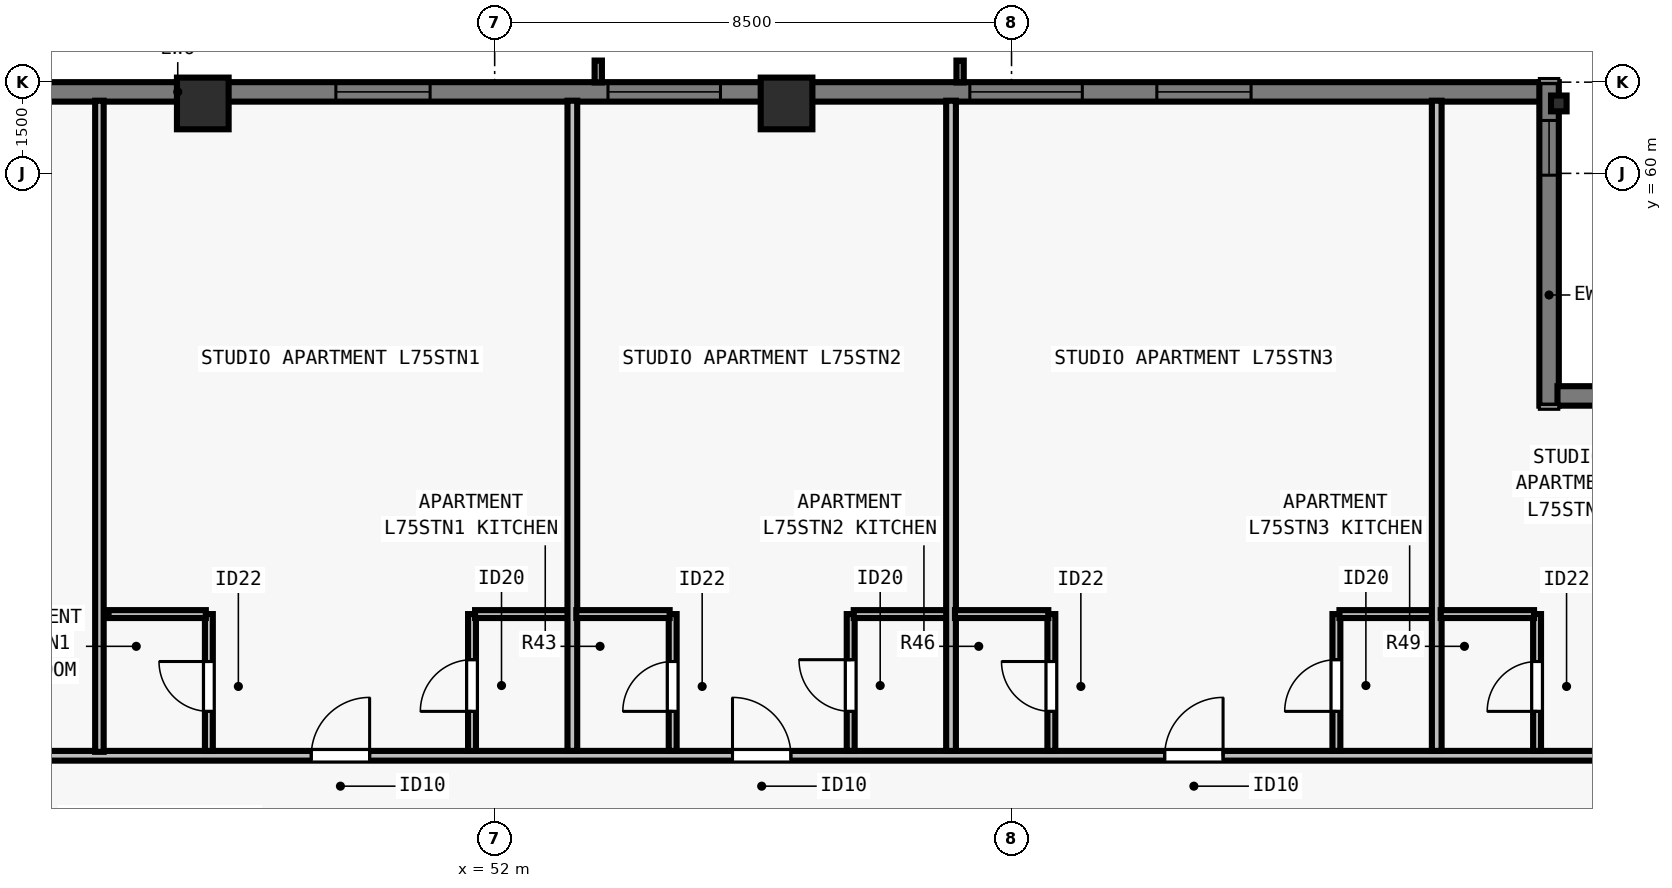
"""IFC4 building model, lengths in metres.
Left out: names, types, materials, properties, quantities, classifications, styles, units other than length and angle.
Written with IfcOpenShell. Run it as: python <this file> out.ifc"""

import sys

from ifc_helpers import new_model, si_unit, direction, frame, frame_2d, origin, origin_2d, place, context, subcontext, project, spatial, rectangle, i_section, extrude, element, fill, save


model = new_model("IFC4")
c1 = context("Model", 3, precision=1e-05, world=origin(), true_north=direction((0.0, 1.0)))
c2 = subcontext(c1, "Body", "Model", "MODEL_VIEW")
j1 = project(units=[si_unit("LENGTHUNIT", "METRE"), si_unit("PLANEANGLEUNIT", "RADIAN")], contexts=[c1])
p1 = place(None, origin())
s1 = spatial("IfcSite", under=j1, at=p1, CompositionType="ELEMENT")
p2 = place(p1, origin())
s2 = spatial("IfcBuilding", under=s1, at=p2, CompositionType="ELEMENT")
p3 = place(p2, frame((0.0, 0.0, 272.5)))
s3 = spatial("IfcBuildingStorey", under=s2, at=p3, CompositionType="ELEMENT", Elevation=272.5)
p4 = place(p3, frame((69.5, 61.15, 0.0), z_axis=(0.0, 0.0, 1.0), x_axis=(1.0, 0.0, 0.0)))
e1 = element("IfcColumn", 1, at=p4, inside=s3, PredefinedType="COLUMN", context=c2, shape_type="SweptSolid", body=[
    extrude(i_section(OverallWidth=0.256, OverallDepth=0.26, WebThickness=0.01, FlangeThickness=0.017, FilletRadius=0.013, at=origin_2d()), origin(), (0.0, 0.0, 1.0), 3.5),
])
for number, where, z_axis, x_axis in (
    (2, (56.8, 61.15, 0.0), (0.0, 0.0, 1.0), (1.0, 0.0, 0.0)),
    (3, (47.2, 61.15, 0.0), (0.0, 0.0, 1.0), (1.0, 0.0, 0.0)),
):
    element("IfcColumn", number, at=place(p3, frame(where, z_axis=z_axis, x_axis=x_axis)), inside=s3, PredefinedType="COLUMN", context=c2, shape_type="SweptSolid", body=[
        extrude(rectangle(XDim=0.85, YDim=0.85, at=origin_2d()), origin(), (0.0, 0.0, 1.0), 3.5),
    ])
p5 = place(p3, frame((34.5, 61.34, 0.0), z_axis=(0.0, 0.0, 1.0), x_axis=(1.0, 0.0, 0.0)))
e4 = element("IfcWall", 4, at=p5, inside=s3, PredefinedType="SOLIDWALL", context=c2, shape_type="SweptSolid", body=[
    extrude(rectangle(XDim=34.702, YDim=0.32, at=frame_2d((17.351, 0.0))), origin(), (0.0, 0.0, 1.0), 3.24),
])
p6 = place(p5, frame((4.613, 0.0, 0.8)))
e5 = element("IfcOpeningElement", 5, at=p6, cuts=e4, PredefinedType="OPENING", context=c2, shape_type="SweptSolid", body=[
    extrude(rectangle(XDim=1.85, YDim=1.628, at=frame_2d((0.925, 0.814))), frame((0.0, 0.17, 0.0), z_axis=(0.0, -1.0, 0.0), x_axis=(1.0, 0.0, 0.0)), (0.0, 0.0, 1.0), 0.34),
])
p7 = place(p5, frame((8.138, 0.0, 0.8)))
e6 = element("IfcOpeningElement", 6, at=p7, cuts=e4, PredefinedType="OPENING", context=c2, shape_type="SweptSolid", body=[
    extrude(rectangle(XDim=1.55, YDim=1.628, at=frame_2d((0.775, 0.814))), frame((0.0, 0.17, 0.0), z_axis=(0.0, -1.0, 0.0), x_axis=(1.0, 0.0, 0.0)), (0.0, 0.0, 1.0), 0.34),
])
p8 = place(p5, frame((14.888, 0.0, 0.8)))
e7 = element("IfcOpeningElement", 7, at=p8, cuts=e4, PredefinedType="OPENING", context=c2, shape_type="SweptSolid", body=[
    extrude(rectangle(XDim=1.55, YDim=1.628, at=frame_2d((0.775, 0.814))), frame((0.0, 0.17, 0.0), z_axis=(0.0, -1.0, 0.0), x_axis=(1.0, 0.0, 0.0)), (0.0, 0.0, 1.0), 0.34),
])
p9 = place(p5, frame((19.364, 0.0, 0.8)))
e8 = element("IfcOpeningElement", 8, at=p9, cuts=e4, PredefinedType="OPENING", context=c2, shape_type="SweptSolid", body=[
    extrude(rectangle(XDim=1.85, YDim=1.628, at=frame_2d((0.925, 0.814))), frame((0.0, 0.17, 0.0), z_axis=(0.0, -1.0, 0.0), x_axis=(1.0, 0.0, 0.0)), (0.0, 0.0, 1.0), 0.34),
])
p10 = place(p5, frame((25.314, 0.0, 0.8)))
e9 = element("IfcOpeningElement", 9, at=p10, cuts=e4, PredefinedType="OPENING", context=c2, shape_type="SweptSolid", body=[
    extrude(rectangle(XDim=1.85, YDim=1.628, at=frame_2d((0.925, 0.814))), frame((0.0, 0.17, 0.0), z_axis=(0.0, -1.0, 0.0), x_axis=(1.0, 0.0, 0.0)), (0.0, 0.0, 1.0), 0.34),
])
p11 = place(p5, frame((28.389, 0.0, 0.8)))
e10 = element("IfcOpeningElement", 10, at=p11, cuts=e4, PredefinedType="OPENING", context=c2, shape_type="SweptSolid", body=[
    extrude(rectangle(XDim=1.55, YDim=1.628, at=frame_2d((0.775, 0.814))), frame((0.0, 0.17, 0.0), z_axis=(0.0, -1.0, 0.0), x_axis=(1.0, 0.0, 0.0)), (0.0, 0.0, 1.0), 0.34),
])
p12 = place(p3, frame((69.34, 61.5, 0.0), z_axis=(0.0, 0.0, 1.0), x_axis=(0.0, -1.0, 0.0)))
e11 = element("IfcWall", 11, at=p12, inside=s3, PredefinedType="SOLIDWALL", context=c2, shape_type="SweptSolid", body=[
    extrude(rectangle(XDim=5.32, YDim=0.32, at=frame_2d((2.66, 0.0))), origin(), (0.0, 0.0, 1.0), 3.24),
])
p13 = place(p12, frame((0.63, 0.0, 0.8)))
e12 = element("IfcOpeningElement", 12, at=p13, cuts=e11, PredefinedType="OPENING", context=c2, shape_type="SweptSolid", body=[
    extrude(rectangle(XDim=0.9, YDim=1.628, at=frame_2d((0.45, 0.814))), frame((0.0, 0.17, 0.0), z_axis=(0.0, -1.0, 0.0), x_axis=(1.0, 0.0, 0.0)), (0.0, 0.0, 1.0), 0.34),
])
p14 = place(p3, frame((69.478, 56.34, 0.0), z_axis=(0.0, 0.0, 1.0), x_axis=(1.0, 0.0, 0.0)))
e13 = element("IfcWall", 13, at=p14, inside=s3, PredefinedType="SOLIDWALL", context=c2, shape_type="SweptSolid", body=[
    extrude(rectangle(XDim=4.724, YDim=0.32, at=frame_2d((2.362, 0.0))), origin(), (0.0, 0.0, 1.0), 3.24),
])
p15 = place(p3, frame((29.805, 50.423, 0.0), z_axis=(0.0, 0.0, 1.0), x_axis=(1.0, 0.0, 0.0)))
e14 = element("IfcWall", 14, at=p15, inside=s3, PredefinedType="PARTITIONING", context=c2, shape_type="SweptSolid", body=[
    extrude(rectangle(XDim=44.39, YDim=0.16, at=frame_2d((22.195, 0.0))), origin(), (0.0, 0.0, 1.0), 2.908),
])
p16 = place(p15, frame((5.465, 0.0, 0.0)))
e15 = element("IfcOpeningElement", 15, at=p16, cuts=e14, PredefinedType="OPENING", context=c2, shape_type="SweptSolid", body=[
    extrude(rectangle(XDim=0.96, YDim=2.12, at=frame_2d((0.48, 1.06))), frame((0.0, 0.09, 0.0), z_axis=(0.0, -1.0, 0.0), x_axis=(1.0, 0.0, 0.0)), (0.0, 0.0, 1.0), 0.18),
])
p17 = place(p15, frame((19.179, 0.0, 0.0)))
e16 = element("IfcOpeningElement", 16, at=p17, cuts=e14, PredefinedType="OPENING", context=c2, shape_type="SweptSolid", body=[
    extrude(rectangle(XDim=0.96, YDim=2.18, at=frame_2d((0.48, 1.09))), frame((0.0, 0.09, 0.0), z_axis=(0.0, -1.0, 0.0), x_axis=(1.0, 0.0, 0.0)), (0.0, 0.0, 1.0), 0.18),
])
p18 = place(p15, frame((26.106, 0.0, 0.0)))
e17 = element("IfcOpeningElement", 17, at=p18, cuts=e14, PredefinedType="OPENING", context=c2, shape_type="SweptSolid", body=[
    extrude(rectangle(XDim=0.96, YDim=2.18, at=frame_2d((0.48, 1.09))), frame((0.0, 0.09, 0.0), z_axis=(0.0, -1.0, 0.0), x_axis=(1.0, 0.0, 0.0)), (0.0, 0.0, 1.0), 0.18),
])
p19 = place(p15, frame((33.214, 0.0, 0.0)))
e18 = element("IfcOpeningElement", 18, at=p19, cuts=e14, PredefinedType="OPENING", context=c2, shape_type="SweptSolid", body=[
    extrude(rectangle(XDim=0.96, YDim=2.18, at=frame_2d((0.48, 1.09))), frame((0.0, 0.09, 0.0), z_axis=(0.0, -1.0, 0.0), x_axis=(1.0, 0.0, 0.0)), (0.0, 0.0, 1.0), 0.18),
])
p20 = place(p15, frame((40.501, 0.0, 0.0)))
e19 = element("IfcOpeningElement", 19, at=p20, cuts=e14, PredefinedType="OPENING", context=c2, shape_type="SweptSolid", body=[
    extrude(rectangle(XDim=0.96, YDim=2.18, at=frame_2d((0.48, 1.09))), frame((0.0, 0.09, 0.0), z_axis=(0.0, -1.0, 0.0), x_axis=(1.0, 0.0, 0.0)), (0.0, 0.0, 1.0), 0.18),
])
p21 = place(p3, frame((45.5, 50.488, 0.0), z_axis=(0.0, 0.0, 1.0), x_axis=(0.0, 1.0, 0.0)))
e20 = element("IfcWall", 20, at=p21, inside=s3, PredefinedType="PARTITIONING", context=c2, shape_type="SweptSolid", body=[
    extrude(rectangle(XDim=10.708, YDim=0.14, at=frame_2d((5.354, 0.0))), origin(), (0.0, 0.0, 1.0), 3.24),
])
p22 = place(p3, frame((47.3, 50.502, 0.0), z_axis=(0.0, 0.0, 1.0), x_axis=(0.0, 1.0, 0.0)))
e21 = element("IfcWall", 21, at=p22, inside=s3, PredefinedType="PLUMBINGWALL", context=c2, shape_type="SweptSolid", body=[
    extrude(rectangle(XDim=2.25, YDim=0.13, at=frame_2d((1.125, 0.0))), origin(), (0.0, 0.0, 1.0), 2.523),
])
p23 = place(p22, frame((0.65, 0.0, 0.0)))
e22 = element("IfcOpeningElement", 22, at=p23, cuts=e21, PredefinedType="OPENING", context=c2, shape_type="SweptSolid", body=[
    extrude(rectangle(XDim=0.82, YDim=2.1, at=frame_2d((0.41, 1.05))), frame((0.0, 0.075, 0.0), z_axis=(0.0, -1.0, 0.0), x_axis=(1.0, 0.0, 0.0)), (0.0, 0.0, 1.0), 0.15),
])
p24 = place(p3, frame((45.65, 52.752, 0.0), z_axis=(0.0, 0.0, 1.0), x_axis=(1.0, 0.0, 0.0)))
e23 = element("IfcWall", 23, at=p24, inside=s3, PredefinedType="PLUMBINGWALL", context=c2, shape_type="SweptSolid", body=[
    extrude(rectangle(XDim=1.6, YDim=0.13, at=frame_2d((0.8, 0.0))), origin(), (0.0, 0.0, 1.0), 3.24),
])
p25 = place(p3, frame((51.627, 50.502, 0.0), z_axis=(0.0, 0.0, 1.0), x_axis=(0.0, 1.0, 0.0)))
e24 = element("IfcWall", 24, at=p25, inside=s3, PredefinedType="PLUMBINGWALL", context=c2, shape_type="SweptSolid", body=[
    extrude(rectangle(XDim=2.25, YDim=0.13, at=frame_2d((1.125, 0.0))), origin(), (0.0, 0.0, 1.0), 3.24),
])
p26 = place(p25, frame((0.65, 0.0, 0.0)))
e25 = element("IfcOpeningElement", 25, at=p26, cuts=e24, PredefinedType="OPENING", context=c2, shape_type="SweptSolid", body=[
    extrude(rectangle(XDim=0.85, YDim=2.1, at=frame_2d((0.425, 1.05))), frame((0.0, 0.075, 0.0), z_axis=(0.0, -1.0, 0.0), x_axis=(1.0, 0.0, 0.0)), (0.0, 0.0, 1.0), 0.15),
])
p27 = place(p3, frame((51.677, 52.752, 0.0), z_axis=(0.0, 0.0, 1.0), x_axis=(1.0, 0.0, 0.0)))
e26 = element("IfcWall", 26, at=p27, inside=s3, PredefinedType="PLUMBINGWALL", context=c2, shape_type="SweptSolid", body=[
    extrude(rectangle(XDim=1.6, YDim=0.13, at=frame_2d((0.8, 0.0))), origin(), (0.0, 0.0, 1.0), 3.24),
])
p28 = place(p3, frame((53.278, 50.502, 0.0), z_axis=(0.0, 0.0, 1.0), x_axis=(0.0, 1.0, 0.0)))
e27 = element("IfcWall", 27, at=p28, inside=s3, PredefinedType="PARTITIONING", context=c2, shape_type="SweptSolid", body=[
    extrude(rectangle(XDim=10.693, YDim=0.16, at=frame_2d((5.346, 0.0))), origin(), (0.0, 0.0, 1.0), 2.908),
])
p29 = place(p3, frame((54.927, 50.502, 0.0), z_axis=(0.0, 0.0, 1.0), x_axis=(0.0, 1.0, 0.0)))
e28 = element("IfcWall", 28, at=p29, inside=s3, PredefinedType="PLUMBINGWALL", context=c2, shape_type="SweptSolid", body=[
    extrude(rectangle(XDim=2.25, YDim=0.13, at=frame_2d((1.125, 0.0))), origin(), (0.0, 0.0, 1.0), 3.24),
])
p30 = place(p29, frame((0.65, 0.0, 0.0)))
e29 = element("IfcOpeningElement", 29, at=p30, cuts=e28, PredefinedType="OPENING", context=c2, shape_type="SweptSolid", body=[
    extrude(rectangle(XDim=0.82, YDim=2.1, at=frame_2d((0.41, 1.05))), frame((0.0, 0.075, 0.0), z_axis=(0.0, -1.0, 0.0), x_axis=(1.0, 0.0, 0.0)), (0.0, 0.0, 1.0), 0.15),
])
p31 = place(p3, frame((53.343, 52.752, 0.0), z_axis=(0.0, 0.0, 1.0), x_axis=(1.0, 0.0, 0.0)))
e30 = element("IfcWall", 30, at=p31, inside=s3, PredefinedType="PLUMBINGWALL", context=c2, shape_type="SweptSolid", body=[
    extrude(rectangle(XDim=1.535, YDim=0.13, at=frame_2d((0.768, 0.0))), origin(), (0.0, 0.0, 1.0), 3.24),
])
p32 = place(p3, frame((57.855, 50.502, 0.0), z_axis=(0.0, 0.0, 1.0), x_axis=(0.0, 1.0, 0.0)))
e31 = element("IfcWall", 31, at=p32, inside=s3, PredefinedType="PLUMBINGWALL", context=c2, shape_type="SweptSolid", body=[
    extrude(rectangle(XDim=2.25, YDim=0.13, at=frame_2d((1.125, 0.0))), origin(), (0.0, 0.0, 1.0), 3.24),
])
p33 = place(p32, frame((0.65, 0.0, 0.0)))
e32 = element("IfcOpeningElement", 32, at=p33, cuts=e31, PredefinedType="OPENING", context=c2, shape_type="SweptSolid", body=[
    extrude(rectangle(XDim=0.85, YDim=2.1, at=frame_2d((0.425, 1.05))), frame((0.0, 0.075, 0.0), z_axis=(0.0, -1.0, 0.0), x_axis=(1.0, 0.0, 0.0)), (0.0, 0.0, 1.0), 0.15),
])
p34 = place(p3, frame((57.905, 52.752, 0.0), z_axis=(0.0, 0.0, 1.0), x_axis=(1.0, 0.0, 0.0)))
e33 = element("IfcWall", 33, at=p34, inside=s3, PredefinedType="PLUMBINGWALL", context=c2, shape_type="SweptSolid", body=[
    extrude(rectangle(XDim=1.6, YDim=0.13, at=frame_2d((0.8, 0.0))), origin(), (0.0, 0.0, 1.0), 3.24),
])
p35 = place(p3, frame((59.505, 50.502, 0.0), z_axis=(0.0, 0.0, 1.0), x_axis=(0.0, 1.0, 0.0)))
e34 = element("IfcWall", 34, at=p35, inside=s3, PredefinedType="PARTITIONING", context=c2, shape_type="SweptSolid", body=[
    extrude(rectangle(XDim=10.693, YDim=0.16, at=frame_2d((5.346, 0.0))), origin(), (0.0, 0.0, 1.0), 3.24),
])
p36 = place(p3, frame((61.155, 50.502, 0.0), z_axis=(0.0, 0.0, 1.0), x_axis=(0.0, 1.0, 0.0)))
e35 = element("IfcWall", 35, at=p36, inside=s3, PredefinedType="PLUMBINGWALL", context=c2, shape_type="SweptSolid", body=[
    extrude(rectangle(XDim=2.25, YDim=0.13, at=frame_2d((1.125, 0.0))), origin(), (0.0, 0.0, 1.0), 3.24),
])
p37 = place(p36, frame((0.65, 0.0, 0.0)))
e36 = element("IfcOpeningElement", 36, at=p37, cuts=e35, PredefinedType="OPENING", context=c2, shape_type="SweptSolid", body=[
    extrude(rectangle(XDim=0.82, YDim=2.1, at=frame_2d((0.41, 1.05))), frame((0.0, 0.075, 0.0), z_axis=(0.0, -1.0, 0.0), x_axis=(1.0, 0.0, 0.0)), (0.0, 0.0, 1.0), 0.15),
])
p38 = place(p3, frame((59.57, 52.752, 0.0), z_axis=(0.0, 0.0, 1.0), x_axis=(1.0, 0.0, 0.0)))
e37 = element("IfcWall", 37, at=p38, inside=s3, PredefinedType="PLUMBINGWALL", context=c2, shape_type="SweptSolid", body=[
    extrude(rectangle(XDim=1.535, YDim=0.13, at=frame_2d((0.768, 0.0))), origin(), (0.0, 0.0, 1.0), 3.24),
])
p39 = place(p3, frame((65.843, 50.502, 0.0), z_axis=(0.0, 0.0, 1.0), x_axis=(0.0, 1.0, 0.0)))
e38 = element("IfcWall", 38, at=p39, inside=s3, PredefinedType="PLUMBINGWALL", context=c2, shape_type="SweptSolid", body=[
    extrude(rectangle(XDim=2.25, YDim=0.13, at=frame_2d((1.125, 0.0))), origin(), (0.0, 0.0, 1.0), 3.24),
])
p40 = place(p39, frame((0.65, 0.0, 0.0)))
e39 = element("IfcOpeningElement", 39, at=p40, cuts=e38, PredefinedType="OPENING", context=c2, shape_type="SweptSolid", body=[
    extrude(rectangle(XDim=0.85, YDim=2.1, at=frame_2d((0.425, 1.05))), frame((0.0, 0.075, 0.0), z_axis=(0.0, -1.0, 0.0), x_axis=(1.0, 0.0, 0.0)), (0.0, 0.0, 1.0), 0.15),
])
p41 = place(p3, frame((65.893, 52.752, 0.0), z_axis=(0.0, 0.0, 1.0), x_axis=(1.0, 0.0, 0.0)))
e40 = element("IfcWall", 40, at=p41, inside=s3, PredefinedType="PLUMBINGWALL", context=c2, shape_type="SweptSolid", body=[
    extrude(rectangle(XDim=1.6, YDim=0.13, at=frame_2d((0.8, 0.0))), origin(), (0.0, 0.0, 1.0), 3.24),
])
p42 = place(p3, frame((67.492, 50.502, 0.0), z_axis=(0.0, 0.0, 1.0), x_axis=(0.0, 1.0, 0.0)))
e41 = element("IfcWall", 41, at=p42, inside=s3, PredefinedType="PARTITIONING", context=c2, shape_type="SweptSolid", body=[
    extrude(rectangle(XDim=10.693, YDim=0.16, at=frame_2d((5.346, 0.0))), origin(), (0.0, 0.0, 1.0), 2.523),
])
p43 = place(p3, frame((69.143, 50.502, 0.0), z_axis=(0.0, 0.0, 1.0), x_axis=(0.0, 1.0, 0.0)))
e42 = element("IfcWall", 42, at=p43, inside=s3, PredefinedType="PLUMBINGWALL", context=c2, shape_type="SweptSolid", body=[
    extrude(rectangle(XDim=2.25, YDim=0.13, at=frame_2d((1.125, 0.0))), origin(), (0.0, 0.0, 1.0), 3.24),
])
p44 = place(p43, frame((0.65, 0.0, 0.0)))
e43 = element("IfcOpeningElement", 43, at=p44, cuts=e42, PredefinedType="OPENING", context=c2, shape_type="SweptSolid", body=[
    extrude(rectangle(XDim=0.82, YDim=2.1, at=frame_2d((0.41, 1.05))), frame((0.0, 0.075, 0.0), z_axis=(0.0, -1.0, 0.0), x_axis=(1.0, 0.0, 0.0)), (0.0, 0.0, 1.0), 0.15),
])
p45 = place(p3, frame((67.558, 52.752, 0.0), z_axis=(0.0, 0.0, 1.0), x_axis=(1.0, 0.0, 0.0)))
e44 = element("IfcWall", 44, at=p45, inside=s3, PredefinedType="PLUMBINGWALL", context=c2, shape_type="SweptSolid", body=[
    extrude(rectangle(XDim=1.535, YDim=0.13, at=frame_2d((0.768, 0.0))), origin(), (0.0, 0.0, 1.0), 2.908),
])
p46 = place(p8, origin())
e45 = element("IfcWindow", 45, at=p46, inside=s3, PartitioningType="SINGLE_PANEL", PredefinedType="WINDOW", context=c2, shape_type="SweptSolid", body=[
    extrude(rectangle(XDim=1.55, YDim=1.628, at=frame_2d((0.775, 0.814))), frame((0.0, -0.05, 0.0), z_axis=(0.0, -1.0, 0.0), x_axis=(1.0, 0.0, 0.0)), (0.0, 0.0, 1.0), 0.06),
])
fill(e7, e45)
p47 = place(p9, origin())
e46 = element("IfcWindow", 46, at=p47, inside=s3, PartitioningType="SINGLE_PANEL", PredefinedType="WINDOW", context=c2, shape_type="SweptSolid", body=[
    extrude(rectangle(XDim=1.85, YDim=1.628, at=frame_2d((0.925, 0.814))), frame((0.0, -0.05, 0.0), z_axis=(0.0, -1.0, 0.0), x_axis=(1.0, 0.0, 0.0)), (0.0, 0.0, 1.0), 0.06),
])
fill(e8, e46)
p48 = place(p10, origin())
e47 = element("IfcWindow", 47, at=p48, inside=s3, PartitioningType="SINGLE_PANEL", PredefinedType="WINDOW", context=c2, shape_type="SweptSolid", body=[
    extrude(rectangle(XDim=1.85, YDim=1.628, at=frame_2d((0.925, 0.814))), frame((0.0, -0.05, 0.0), z_axis=(0.0, -1.0, 0.0), x_axis=(1.0, 0.0, 0.0)), (0.0, 0.0, 1.0), 0.06),
])
fill(e9, e47)
p49 = place(p11, origin())
e48 = element("IfcWindow", 48, at=p49, inside=s3, PartitioningType="SINGLE_PANEL", PredefinedType="WINDOW", context=c2, shape_type="SweptSolid", body=[
    extrude(rectangle(XDim=1.55, YDim=1.628, at=frame_2d((0.775, 0.814))), frame((0.0, -0.05, 0.0), z_axis=(0.0, -1.0, 0.0), x_axis=(1.0, 0.0, 0.0)), (0.0, 0.0, 1.0), 0.06),
])
fill(e10, e48)
p50 = place(p13, origin())
e49 = element("IfcWindow", 49, at=p50, inside=s3, PartitioningType="SINGLE_PANEL", PredefinedType="WINDOW", context=c2, shape_type="SweptSolid", body=[
    extrude(rectangle(XDim=0.9, YDim=1.628, at=frame_2d((0.45, 0.814))), frame((0.0, -0.04, 0.0), z_axis=(0.0, -1.0, 0.0), x_axis=(1.0, 0.0, 0.0)), (0.0, 0.0, 1.0), 0.06),
])
fill(e12, e49)
p51 = place(p23, origin())
e50 = element("IfcDoor", 50, at=p51, inside=s3, OperationType="SINGLE_SWING_RIGHT", PredefinedType="DOOR", context=c2, shape_type="SweptSolid", body=[
    extrude(rectangle(XDim=0.82, YDim=2.1, at=frame_2d((0.41, 1.05))), frame((0.0, 0.025, 0.0), z_axis=(0.0, -1.0, 0.0), x_axis=(1.0, 0.0, 0.0)), (0.0, 0.0, 1.0), 0.05),
])
fill(e22, e50)
p52 = place(p26, origin())
e51 = element("IfcDoor", 51, at=p52, inside=s3, OperationType="SINGLE_SWING_LEFT", PredefinedType="DOOR", context=c2, shape_type="SweptSolid", body=[
    extrude(rectangle(XDim=0.85, YDim=2.1, at=frame_2d((0.425, 1.05))), frame((0.0, 0.025, 0.0), z_axis=(0.0, -1.0, 0.0), x_axis=(1.0, 0.0, 0.0)), (0.0, 0.0, 1.0), 0.05),
])
fill(e25, e51)
p53 = place(p17, origin())
e52 = element("IfcDoor", 52, at=p53, inside=s3, OperationType="SINGLE_SWING_RIGHT", PredefinedType="DOOR", context=c2, shape_type="SweptSolid", body=[
    extrude(rectangle(XDim=0.96, YDim=2.18, at=frame_2d((0.48, 1.09))), frame((0.0, 0.025, 0.0), z_axis=(0.0, -1.0, 0.0), x_axis=(1.0, 0.0, 0.0)), (0.0, 0.0, 1.0), 0.05),
])
fill(e16, e52)
p54 = place(p30, origin())
e53 = element("IfcDoor", 53, at=p54, inside=s3, OperationType="SINGLE_SWING_LEFT", PredefinedType="DOOR", context=c2, shape_type="SweptSolid", body=[
    extrude(rectangle(XDim=0.82, YDim=2.1, at=frame_2d((0.41, 1.05))), frame((0.0, 0.025, 0.0), z_axis=(0.0, -1.0, 0.0), x_axis=(1.0, 0.0, 0.0)), (0.0, 0.0, 1.0), 0.05),
])
fill(e29, e53)
p55 = place(p33, origin())
e54 = element("IfcDoor", 54, at=p55, inside=s3, OperationType="SINGLE_SWING_RIGHT", PredefinedType="DOOR", context=c2, shape_type="SweptSolid", body=[
    extrude(rectangle(XDim=0.85, YDim=2.1, at=frame_2d((0.425, 1.05))), frame((0.0, 0.025, 0.0), z_axis=(0.0, -1.0, 0.0), x_axis=(1.0, 0.0, 0.0)), (0.0, 0.0, 1.0), 0.05),
])
fill(e32, e54)
p56 = place(p18, origin())
e55 = element("IfcDoor", 55, at=p56, inside=s3, OperationType="SINGLE_SWING_LEFT", PredefinedType="DOOR", context=c2, shape_type="SweptSolid", body=[
    extrude(rectangle(XDim=0.96, YDim=2.18, at=frame_2d((0.48, 1.09))), frame((0.0, 0.025, 0.0), z_axis=(0.0, -1.0, 0.0), x_axis=(1.0, 0.0, 0.0)), (0.0, 0.0, 1.0), 0.05),
])
fill(e17, e55)
p57 = place(p37, origin())
e56 = element("IfcDoor", 56, at=p57, inside=s3, OperationType="SINGLE_SWING_RIGHT", PredefinedType="DOOR", context=c2, shape_type="SweptSolid", body=[
    extrude(rectangle(XDim=0.82, YDim=2.1, at=frame_2d((0.41, 1.05))), frame((0.0, 0.025, 0.0), z_axis=(0.0, -1.0, 0.0), x_axis=(1.0, 0.0, 0.0)), (0.0, 0.0, 1.0), 0.05),
])
fill(e36, e56)
p58 = place(p40, origin())
e57 = element("IfcDoor", 57, at=p58, inside=s3, OperationType="SINGLE_SWING_LEFT", PredefinedType="DOOR", context=c2, shape_type="SweptSolid", body=[
    extrude(rectangle(XDim=0.85, YDim=2.1, at=frame_2d((0.425, 1.05))), frame((0.0, 0.025, 0.0), z_axis=(0.0, -1.0, 0.0), x_axis=(1.0, 0.0, 0.0)), (0.0, 0.0, 1.0), 0.05),
])
fill(e39, e57)
p59 = place(p19, origin())
e58 = element("IfcDoor", 58, at=p59, inside=s3, OperationType="SINGLE_SWING_RIGHT", PredefinedType="DOOR", context=c2, shape_type="SweptSolid", body=[
    extrude(rectangle(XDim=0.96, YDim=2.18, at=frame_2d((0.48, 1.09))), frame((0.0, 0.025, 0.0), z_axis=(0.0, -1.0, 0.0), x_axis=(1.0, 0.0, 0.0)), (0.0, 0.0, 1.0), 0.05),
])
fill(e18, e58)
p60 = place(p44, origin())
e59 = element("IfcDoor", 59, at=p60, inside=s3, OperationType="SINGLE_SWING_LEFT", PredefinedType="DOOR", context=c2, shape_type="SweptSolid", body=[
    extrude(rectangle(XDim=0.82, YDim=2.1, at=frame_2d((0.41, 1.05))), frame((0.0, 0.025, 0.0), z_axis=(0.0, -1.0, 0.0), x_axis=(1.0, 0.0, 0.0)), (0.0, 0.0, 1.0), 0.05),
])
fill(e43, e59)
save(model, sys.argv[1])
